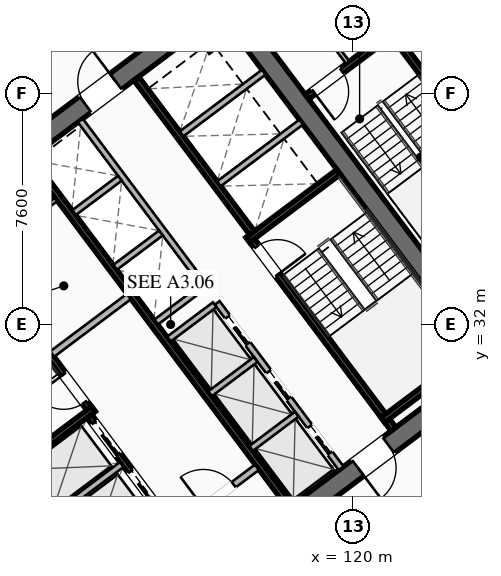
"""IFC4 building model, lengths in metres.
Left out: names, types, materials, properties, quantities, classifications, styles, units other than length and angle.
Written with IfcOpenShell. Run it as: python <this file> out.ifc"""

import sys

from ifc_helpers import new_model, si_unit, direction, frame, frame_2d, origin, place, context, subcontext, project, spatial, rectangle, extrude, element, fill, save


model = new_model("IFC4")
c1 = context("Model", 3, precision=1e-05, world=origin(), true_north=direction((0.0, 1.0)))
c2 = subcontext(c1, "Body", "Model", "MODEL_VIEW")
j1 = project(units=[si_unit("LENGTHUNIT", "METRE"), si_unit("PLANEANGLEUNIT", "RADIAN")], contexts=[c1])
p1 = place(None, origin())
s1 = spatial("IfcSite", under=j1, at=p1, CompositionType="ELEMENT")
p2 = place(p1, origin())
s2 = spatial("IfcBuilding", under=s1, at=p2, CompositionType="ELEMENT")
p3 = place(p2, frame((0.0, 0.0, 92.05)))
s3 = spatial("IfcBuildingStorey", under=s2, at=p3, CompositionType="ELEMENT", Elevation=92.05)
for number, where, z_axis, x_axis in (
    (1, (112.476, 21.107, 0.0), (0.0, 0.0, 1.0), (-0.6, 0.8, 0.0)),
    (2, (115.524, 42.893, 0.0), (0.0, 0.0, 1.0), (0.6, -0.8, 0.0)),
):
    element("IfcWall", number, at=place(p3, frame(where, z_axis=z_axis, x_axis=x_axis)), inside=s3, PredefinedType="SHEAR", context=c2, shape_type="SweptSolid", body=[
        extrude(rectangle(XDim=15.6, YDim=0.65, at=frame_2d((7.8, 0.0))), origin(), (0.0, 0.0, 1.0), 3.55),
    ])
p4 = place(p3, frame((124.429, 30.478, 0.0), z_axis=(0.0, 0.0, 1.0), x_axis=(-0.799998028465, -0.600002628705, 0.0)))
e3 = element("IfcWall", 3, at=p4, inside=s3, PredefinedType="SHEAR", context=c2, shape_type="SweptSolid", body=[
    extrude(rectangle(XDim=14.86, YDim=0.65, at=frame_2d((7.43, 0.0))), origin(), (0.0, 0.0, 1.0), 3.55),
])
p5 = place(p4, frame((9.13, 0.0, 0.0)))
e4 = element("IfcOpeningElement", 4, at=p5, cuts=e3, PredefinedType="OPENING", context=c2, shape_type="SweptSolid", body=[
    extrude(rectangle(XDim=1.25, YDim=2.25, at=frame_2d((0.625, 1.125))), frame((0.0, 0.335, 0.0), z_axis=(0.0, -1.0, 0.0), x_axis=(1.0, 0.0, 0.0)), (0.0, 0.0, 1.0), 0.67),
])
p6 = place(p4, frame((4.08, 0.0, 0.0)))
e5 = element("IfcOpeningElement", 5, at=p6, cuts=e3, PredefinedType="OPENING", context=c2, shape_type="SweptSolid", body=[
    extrude(rectangle(XDim=1.25, YDim=2.25, at=frame_2d((0.625, 1.125))), frame((0.0, 0.335, 0.0), z_axis=(0.0, -1.0, 0.0), x_axis=(1.0, 0.0, 0.0)), (0.0, 0.0, 1.0), 0.67),
])
p7 = place(p3, frame((103.571, 33.522, 0.0), z_axis=(0.0, 0.0, 1.0), x_axis=(0.799998028465, 0.600002628705, 0.0)))
e6 = element("IfcWall", 6, at=p7, inside=s3, PredefinedType="SHEAR", context=c2, shape_type="SweptSolid", body=[
    extrude(rectangle(XDim=14.86, YDim=0.65, at=frame_2d((7.43, 0.0))), origin(), (0.0, 0.0, 1.0), 3.55),
])
p8 = place(p7, frame((4.48, 0.0, 0.0)))
e7 = element("IfcOpeningElement", 7, at=p8, cuts=e6, PredefinedType="OPENING", context=c2, shape_type="SweptSolid", body=[
    extrude(rectangle(XDim=1.25, YDim=2.25, at=frame_2d((0.625, 1.125))), frame((0.0, 0.335, 0.0), z_axis=(0.0, -1.0, 0.0), x_axis=(1.0, 0.0, 0.0)), (0.0, 0.0, 1.0), 0.67),
])
p9 = place(p7, frame((9.53, 0.0, 0.0)))
e8 = element("IfcOpeningElement", 8, at=p9, cuts=e6, PredefinedType="OPENING", context=c2, shape_type="SweptSolid", body=[
    extrude(rectangle(XDim=1.25, YDim=2.25, at=frame_2d((0.625, 1.125))), frame((0.0, 0.335, 0.0), z_axis=(0.0, -1.0, 0.0), x_axis=(1.0, 0.0, 0.0)), (0.0, 0.0, 1.0), 0.67),
])
p10 = place(p3, frame((111.44, 29.08, 0.0), z_axis=(0.0, 0.0, 1.0), x_axis=(-0.600009827119, 0.799992629566, 0.0)))
e9 = element("IfcWall", 9, at=p10, inside=s3, PredefinedType="SHEAR", context=c2, shape_type="SweptSolid", body=[
    extrude(rectangle(XDim=7.95, YDim=0.2, at=frame_2d((3.975, 0.0))), origin(), (0.0, 0.0, 1.0), 3.35),
])
p11 = place(p10, frame((0.45, 0.0, 0.0)))
e10 = element("IfcOpeningElement", 10, at=p11, cuts=e9, PredefinedType="OPENING", context=c2, shape_type="SweptSolid", body=[
    extrude(rectangle(XDim=1.15, YDim=2.2, at=frame_2d((0.575, 1.1))), frame((0.0, 0.11, 0.0), z_axis=(0.0, -1.0, 0.0), x_axis=(1.0, 0.0, 0.0)), (0.0, 0.0, 1.0), 0.22),
])
p12 = place(p3, frame((108.476, 26.982, 0.0), z_axis=(0.0, 0.0, 1.0), x_axis=(0.799984290658, 0.600020945218, 0.0)))
e11 = element("IfcWall", 11, at=p12, inside=s3, PredefinedType="SHEAR", context=c2, shape_type="SweptSolid", body=[
    extrude(rectangle(XDim=3.73, YDim=0.2, at=frame_2d((1.865, 0.0))), origin(), (0.0, 0.0, 1.0), 3.35),
])
p13 = place(p3, frame((116.56, 34.92, 0.0), z_axis=(0.0, 0.0, 1.0), x_axis=(0.600009827119, -0.799992629566, 0.0)))
e12 = element("IfcWall", 12, at=p13, inside=s3, PredefinedType="SHEAR", context=c2, shape_type="SweptSolid", body=[
    extrude(rectangle(XDim=7.95, YDim=0.2, at=frame_2d((3.975, 0.0))), origin(), (0.0, 0.0, 1.0), 3.35),
])
p14 = place(p13, frame((0.45, 0.0, 0.0)))
e13 = element("IfcOpeningElement", 13, at=p14, cuts=e12, PredefinedType="OPENING", context=c2, shape_type="SweptSolid", body=[
    extrude(rectangle(XDim=1.15, YDim=2.2, at=frame_2d((0.575, 1.1))), frame((0.0, 0.11, 0.0), z_axis=(0.0, -1.0, 0.0), x_axis=(1.0, 0.0, 0.0)), (0.0, 0.0, 1.0), 0.22),
])
for number, where, z_axis, x_axis in (
    (14, (116.54, 34.78, 0.0), (0.0, 0.0, 1.0), (0.8, 0.6, 0.0)),
    (15, (120.98, 28.86, 0.0), (0.0, 0.0, 1.0), (0.8, 0.6, 0.0)),
):
    element("IfcWall", number, at=place(p3, frame(where, z_axis=z_axis, x_axis=x_axis)), inside=s3, PredefinedType="SHEAR", context=c2, shape_type="SweptSolid", body=[
        extrude(rectangle(XDim=3.73, YDim=0.2, at=frame_2d((1.865, 0.0))), origin(), (0.0, 0.0, 1.0), 3.35),
    ])
p15 = place(p3, frame((117.938, 26.016, 0.0), z_axis=(0.0, 0.0, 1.0), x_axis=(-0.600005463273, 0.799995902516, 0.0)))
e16 = element("IfcWall", 16, at=p15, inside=s3, PredefinedType="SHEAR", context=c2, shape_type="SweptSolid", body=[
    extrude(rectangle(XDim=14.3, YDim=0.2, at=frame_2d((7.15, 0.0))), origin(), (0.0, 0.0, 1.0), 3.35),
])
p16 = place(p3, frame((110.104, 31.028, 0.0), z_axis=(0.0, 0.0, 1.0), x_axis=(0.800018601094, 0.59997519774, 0.0)))
e17 = element("IfcWall", 17, at=p16, inside=s3, PredefinedType="SOLIDWALL", context=c2, shape_type="SweptSolid", body=[
    extrude(rectangle(XDim=3.15, YDim=0.22, at=frame_2d((1.575, 0.0))), origin(), (0.0, 0.0, 1.0), 2.703),
])
p17 = place(p3, frame((114.316, 25.412, 0.0), z_axis=(0.0, 0.0, 1.0), x_axis=(0.800018601094, 0.59997519774, 0.0)))
e18 = element("IfcWall", 18, at=p17, inside=s3, PredefinedType="SOLIDWALL", context=c2, shape_type="SweptSolid", body=[
    extrude(rectangle(XDim=3.15, YDim=0.22, at=frame_2d((1.575, 0.0))), origin(), (0.0, 0.0, 1.0), 2.703),
])
p18 = place(p17, frame((0.95, 0.0, 0.0)))
e19 = element("IfcOpeningElement", 19, at=p18, cuts=e18, PredefinedType="OPENING", context=c2, shape_type="SweptSolid", body=[
    extrude(rectangle(XDim=1.25, YDim=2.25, at=frame_2d((0.625, 1.125))), frame((0.0, 0.12, 0.0), z_axis=(0.0, -1.0, 0.0), x_axis=(1.0, 0.0, 0.0)), (0.0, 0.0, 1.0), 0.24),
])
p19 = place(p3, frame((115.13, 23.91, 0.0), z_axis=(0.0, 0.0, 1.0), x_axis=(-0.599975393228, 0.800018454488, 0.0)))
e20 = element("IfcWall", 20, at=p19, inside=s3, PredefinedType="SHEAR", context=c2, shape_type="SweptSolid", body=[
    extrude(rectangle(XDim=6.35, YDim=0.2, at=frame_2d((3.175, 0.0))), origin(), (0.0, 0.0, 1.0), 3.35),
])
p20 = place(p19, frame((4.775, 0.0, 0.0)))
e21 = element("IfcOpeningElement", 21, at=p20, cuts=e20, PredefinedType="OPENING", context=c2, shape_type="SweptSolid", body=[
    extrude(rectangle(XDim=1.3, YDim=2.25, at=frame_2d((0.65, 1.125))), frame((0.0, 0.11, 0.0), z_axis=(0.0, -1.0, 0.0), x_axis=(1.0, 0.0, 0.0)), (0.0, 0.0, 1.0), 0.22),
])
p21 = place(p19, frame((2.775, 0.0, 0.0)))
e22 = element("IfcOpeningElement", 22, at=p21, cuts=e20, PredefinedType="OPENING", context=c2, shape_type="SweptSolid", body=[
    extrude(rectangle(XDim=1.3, YDim=2.25, at=frame_2d((0.65, 1.125))), frame((0.0, 0.11, 0.0), z_axis=(0.0, -1.0, 0.0), x_axis=(1.0, 0.0, 0.0)), (0.0, 0.0, 1.0), 0.22),
])
p22 = place(p19, frame((0.575, 0.0, 0.0)))
e23 = element("IfcOpeningElement", 23, at=p22, cuts=e20, PredefinedType="OPENING", context=c2, shape_type="SweptSolid", body=[
    extrude(rectangle(XDim=1.3, YDim=2.25, at=frame_2d((0.65, 1.125))), frame((0.0, 0.11, 0.0), z_axis=(0.0, -1.0, 0.0), x_axis=(1.0, 0.0, 0.0)), (0.0, 0.0, 1.0), 0.22),
])
p23 = place(p3, frame((109.688, 25.366, 0.0), z_axis=(0.0, 0.0, 1.0), x_axis=(0.8, 0.6, 0.0)))
e24 = element("IfcWall", 24, at=p23, inside=s3, PredefinedType="SOLIDWALL", context=c2, shape_type="SweptSolid", body=[
    extrude(rectangle(XDim=3.38, YDim=0.2, at=frame_2d((1.69, 0.0))), origin(), (0.0, 0.0, 1.0), 3.35),
])
p24 = place(p3, frame((112.87, 40.09, 0.0), z_axis=(0.0, 0.0, 1.0), x_axis=(0.599975393228, -0.800018454488, 0.0)))
e25 = element("IfcWall", 25, at=p24, inside=s3, PredefinedType="SHEAR", context=c2, shape_type="SweptSolid", body=[
    extrude(rectangle(XDim=6.35, YDim=0.2, at=frame_2d((3.175, 0.0))), origin(), (0.0, 0.0, 1.0), 3.35),
])
for number, where, z_axis, x_axis in (
    (26, (115.59, 36.63, 0.0), (0.0, 0.0, 1.0), (0.8, 0.6, 0.0)),
    (27, (114.36, 38.27, 0.0), (0.0, 0.0, 1.0), (0.8, 0.6, 0.0)),
):
    element("IfcWall", number, at=place(p3, frame(where, z_axis=z_axis, x_axis=x_axis)), inside=s3, PredefinedType="SOLIDWALL", context=c2, shape_type="SweptSolid", body=[
        extrude(rectangle(XDim=3.38, YDim=0.2, at=frame_2d((1.69, 0.0))), origin(), (0.0, 0.0, 1.0), 3.35),
    ])
p25 = place(p3, frame((107.71, 34.22, 0.0), z_axis=(0.0, 0.0, 1.0), x_axis=(0.799981399002, 0.60002480053, 0.0)))
e28 = element("IfcWall", 28, at=p25, inside=s3, PredefinedType="PARTITIONING", context=c2, shape_type="SweptSolid", body=[
    extrude(rectangle(XDim=3.15, YDim=0.135, at=frame_2d((1.575, 0.0))), origin(), (0.0, 0.0, 1.0), 2.703),
])
p26 = place(p25, frame((1.05, 0.0, 0.0)))
e29 = element("IfcOpeningElement", 29, at=p26, cuts=e28, PredefinedType="OPENING", context=c2, shape_type="SweptSolid", body=[
    extrude(rectangle(XDim=1.05, YDim=2.2, at=frame_2d((0.525, 1.1))), frame((0.0, 0.077, 0.0), z_axis=(0.0, -1.0, 0.0), x_axis=(1.0, 0.0, 0.0)), (0.0, 0.0, 1.0), 0.155),
])
p27 = place(p3, frame((119.61, 27.27, 0.0), z_axis=(0.0, 0.0, 1.0), x_axis=(-0.600011488909, 0.79999138319, 0.0)))
e30 = element("IfcWall", 30, at=p27, inside=s3, PredefinedType="SOLIDWALL", context=c2, shape_type="SweptSolid", body=[
    extrude(rectangle(XDim=6.8, YDim=0.2, at=frame_2d((3.4, 0.0))), origin(), (0.0, 0.0, 1.0), 3.35),
])
p28 = place(p27, frame((0.625, 0.0, 0.0)))
e31 = element("IfcOpeningElement", 31, at=p28, cuts=e30, PredefinedType="OPENING", context=c2, shape_type="SweptSolid", body=[
    extrude(rectangle(XDim=1.1, YDim=2.2, at=frame_2d((0.55, 1.1))), frame((0.0, 0.11, 0.0), z_axis=(0.0, -1.0, 0.0), x_axis=(1.0, 0.0, 0.0)), (0.0, 0.0, 1.0), 0.22),
])
p29 = place(p27, frame((2.875, 0.0, 0.0)))
e32 = element("IfcOpeningElement", 32, at=p29, cuts=e30, PredefinedType="OPENING", context=c2, shape_type="SweptSolid", body=[
    extrude(rectangle(XDim=1.1, YDim=2.2, at=frame_2d((0.55, 1.1))), frame((0.0, 0.11, 0.0), z_axis=(0.0, -1.0, 0.0), x_axis=(1.0, 0.0, 0.0)), (0.0, 0.0, 1.0), 0.22),
])
p30 = place(p27, frame((5.125, 0.0, 0.0)))
e33 = element("IfcOpeningElement", 33, at=p30, cuts=e30, PredefinedType="OPENING", context=c2, shape_type="SweptSolid", body=[
    extrude(rectangle(XDim=1.1, YDim=2.2, at=frame_2d((0.55, 1.1))), frame((0.0, 0.11, 0.0), z_axis=(0.0, -1.0, 0.0), x_axis=(1.0, 0.0, 0.0)), (0.0, 0.0, 1.0), 0.22),
])
p31 = place(p3, frame((116.646, 27.922, 0.0), z_axis=(0.0, 0.0, 1.0), x_axis=(0.8, 0.6, 0.0)))
e34 = element("IfcWall", 34, at=p31, inside=s3, PredefinedType="SOLIDWALL", context=c2, shape_type="SweptSolid", body=[
    extrude(rectangle(XDim=1.88, YDim=0.2, at=frame_2d((0.94, 0.0))), origin(), (0.0, 0.0, 1.0), 3.35),
])
p32 = place(p3, frame((115.296, 29.722, 0.0), z_axis=(0.0, 0.0, 1.0), x_axis=(0.799984418148, 0.600020775241, 0.0)))
e35 = element("IfcWall", 35, at=p32, inside=s3, PredefinedType="SOLIDWALL", context=c2, shape_type="SweptSolid", body=[
    extrude(rectangle(XDim=1.88, YDim=0.2, at=frame_2d((0.94, 0.0))), origin(), (0.0, 0.0, 1.0), 3.35),
])
p33 = place(p3, frame((113.946, 31.522, 0.0), z_axis=(0.0, 0.0, 1.0), x_axis=(0.8, 0.6, 0.0)))
e36 = element("IfcWall", 36, at=p33, inside=s3, PredefinedType="SOLIDWALL", context=c2, shape_type="SweptSolid", body=[
    extrude(rectangle(XDim=1.88, YDim=0.2, at=frame_2d((0.94, 0.0))), origin(), (0.0, 0.0, 1.0), 3.35),
])
p34 = place(p3, frame((115.11, 33.27, 0.0), z_axis=(0.0, 0.0, 1.0), x_axis=(-0.600011488909, 0.79999138319, 0.0)))
e37 = element("IfcWall", 37, at=p34, inside=s3, PredefinedType="SOLIDWALL", context=c2, shape_type="SweptSolid", body=[
    extrude(rectangle(XDim=6.8, YDim=0.2, at=frame_2d((3.4, 0.0))), origin(), (0.0, 0.0, 1.0), 3.35),
])
p35 = place(p3, frame((113.526, 32.082, 0.0), z_axis=(0.0, 0.0, 1.0), x_axis=(0.800046745961, 0.599937666993, 0.0)))
e38 = element("IfcWall", 38, at=p35, inside=s3, PredefinedType="SOLIDWALL", context=c2, shape_type="SweptSolid", body=[
    extrude(rectangle(XDim=1.88, YDim=0.2, at=frame_2d((0.94, 0.0))), origin(), (0.0, 0.0, 1.0), 3.35),
])
p36 = place(p3, frame((112.176, 33.882, 0.0), z_axis=(0.0, 0.0, 1.0), x_axis=(0.8, 0.6, 0.0)))
e39 = element("IfcWall", 39, at=p36, inside=s3, PredefinedType="SOLIDWALL", context=c2, shape_type="SweptSolid", body=[
    extrude(rectangle(XDim=1.88, YDim=0.2, at=frame_2d((0.94, 0.0))), origin(), (0.0, 0.0, 1.0), 3.35),
])
p37 = place(p3, frame((110.826, 35.682, 0.0), z_axis=(0.0, 0.0, 1.0), x_axis=(0.799984418148, 0.600020775241, 0.0)))
e40 = element("IfcWall", 40, at=p37, inside=s3, PredefinedType="SOLIDWALL", context=c2, shape_type="SweptSolid", body=[
    extrude(rectangle(XDim=1.88, YDim=0.2, at=frame_2d((0.94, 0.0))), origin(), (0.0, 0.0, 1.0), 3.35),
])
p38 = place(p3, frame((125.304, 36.228, 0.0), z_axis=(0.0, 0.0, 1.0), x_axis=(-0.59998851072, 0.800008616831, 0.0)))
e41 = element("IfcWall", 41, at=p38, inside=s3, PredefinedType="SHEAR", context=c2, shape_type="SweptSolid", body=[
    extrude(rectangle(XDim=6.8, YDim=0.2, at=frame_2d((3.4, 0.0))), origin(), (0.0, 0.0, 1.0), 3.35),
])
p39 = place(p3, frame((121.204, 41.528, 0.0), z_axis=(0.0, 0.0, 1.0), x_axis=(-0.800017232136, -0.599977023131, 0.0)))
e42 = element("IfcWall", 42, at=p39, inside=s3, PredefinedType="SHEAR", context=c2, shape_type="SweptSolid", body=[
    extrude(rectangle(XDim=3.4, YDim=0.2, at=frame_2d((1.7, 0.0))), origin(), (0.0, 0.0, 1.0), 3.35),
])
p40 = place(p39, frame((1.975, 0.0, 0.0)))
e43 = element("IfcOpeningElement", 43, at=p40, cuts=e42, PredefinedType="OPENING", context=c2, shape_type="SweptSolid", body=[
    extrude(rectangle(XDim=1.15, YDim=2.2, at=frame_2d((0.575, 1.1))), frame((0.0, 0.11, 0.0), z_axis=(0.0, -1.0, 0.0), x_axis=(1.0, 0.0, 0.0)), (0.0, 0.0, 1.0), 0.22),
])
p41 = place(p3, frame((119.824, 40.618, 0.0), z_axis=(0.0, 0.0, 1.0), x_axis=(-0.599982243973, 0.800013316712, 0.0)))
e44 = element("IfcWall", 44, at=p41, inside=s3, PredefinedType="PARTITIONING", context=c2, shape_type="SweptSolid", body=[
    extrude(rectangle(XDim=4.4, YDim=0.135, at=frame_2d((2.2, 0.0))), origin(), (0.0, 0.0, 1.0), 2.703),
])
p42 = place(p3, frame((98.316, 33.862, 0.0), z_axis=(0.0, 0.0, 1.0), x_axis=(0.8000041147, 0.599994513695, 0.0)))
e45 = element("IfcWall", 45, at=p42, inside=s3, PredefinedType="PARTITIONING", context=c2, shape_type="SweptSolid", body=[
    extrude(rectangle(XDim=28.48, YDim=0.135, at=frame_2d((14.24, 0.0))), origin(), (0.0, 0.0, 1.0), 2.703),
])
p43 = place(p42, frame((0.3, 0.0, 0.0)))
e46 = element("IfcOpeningElement", 46, at=p43, cuts=e45, PredefinedType="OPENING", context=c2, shape_type="SweptSolid", body=[
    extrude(rectangle(XDim=0.95, YDim=2.05, at=frame_2d((0.475, 1.025))), frame((0.0, 0.077, 0.0), z_axis=(0.0, -1.0, 0.0), x_axis=(1.0, 0.0, 0.0)), (0.0, 0.0, 1.0), 0.155),
])
p44 = place(p42, frame((7.195, 0.0, 0.0)))
e47 = element("IfcOpeningElement", 47, at=p44, cuts=e45, PredefinedType="OPENING", context=c2, shape_type="SweptSolid", body=[
    extrude(rectangle(XDim=0.95, YDim=2.05, at=frame_2d((0.475, 1.025))), frame((0.0, 0.077, 0.0), z_axis=(0.0, -1.0, 0.0), x_axis=(1.0, 0.0, 0.0)), (0.0, 0.0, 1.0), 0.155),
])
p45 = place(p42, frame((11.222, 0.0, 0.0)))
e48 = element("IfcOpeningElement", 48, at=p45, cuts=e45, PredefinedType="OPENING", context=c2, shape_type="SweptSolid", body=[
    extrude(rectangle(XDim=0.95, YDim=2.05, at=frame_2d((0.475, 1.025))), frame((0.0, 0.077, 0.0), z_axis=(0.0, -1.0, 0.0), x_axis=(1.0, 0.0, 0.0)), (0.0, 0.0, 1.0), 0.155),
])
p46 = place(p42, frame((27.23, 0.0, 0.0)))
e49 = element("IfcOpeningElement", 49, at=p46, cuts=e45, PredefinedType="OPENING", context=c2, shape_type="SweptSolid", body=[
    extrude(rectangle(XDim=0.95, YDim=2.05, at=frame_2d((0.475, 1.025))), frame((0.0, 0.077, 0.0), z_axis=(0.0, -1.0, 0.0), x_axis=(1.0, 0.0, 0.0)), (0.0, 0.0, 1.0), 0.155),
])
p47 = place(p3, frame((134.462, 33.134, 0.0), z_axis=(0.0, 0.0, 1.0), x_axis=(-0.799996913945, -0.600004114717, 0.0)))
e50 = element("IfcWall", 50, at=p47, inside=s3, PredefinedType="PARTITIONING", context=c2, shape_type="SweptSolid", body=[
    extrude(rectangle(XDim=28.48, YDim=0.135, at=frame_2d((14.24, 0.0))), origin(), (0.0, 0.0, 1.0), 2.703),
])
p48 = place(p47, frame((27.15, 0.0, 0.0)))
e51 = element("IfcOpeningElement", 51, at=p48, cuts=e50, PredefinedType="OPENING", context=c2, shape_type="SweptSolid", body=[
    extrude(rectangle(XDim=0.95, YDim=2.05, at=frame_2d((0.475, 1.025))), frame((0.0, 0.077, 0.0), z_axis=(0.0, -1.0, 0.0), x_axis=(1.0, 0.0, 0.0)), (0.0, 0.0, 1.0), 0.155),
])
p49 = place(p47, frame((0.38, 0.0, 0.0)))
e52 = element("IfcOpeningElement", 52, at=p49, cuts=e50, PredefinedType="OPENING", context=c2, shape_type="SweptSolid", body=[
    extrude(rectangle(XDim=0.95, YDim=2.05, at=frame_2d((0.475, 1.025))), frame((0.0, 0.077, 0.0), z_axis=(0.0, -1.0, 0.0), x_axis=(1.0, 0.0, 0.0)), (0.0, 0.0, 1.0), 0.155),
])
p50 = place(p3, frame((111.63, 16.11, 0.0), z_axis=(0.0, 0.0, 1.0), x_axis=(-0.599996466511, 0.800002650104, 0.0)))
e53 = element("IfcWall", 53, at=p50, inside=s3, PredefinedType="PARTITIONING", context=c2, shape_type="SweptSolid", body=[
    extrude(rectangle(XDim=22.11, YDim=0.135, at=frame_2d((11.055, 0.0))), origin(), (0.0, 0.0, 1.0), 2.703),
])
p51 = place(p50, frame((0.3, 0.0, 0.0)))
e54 = element("IfcOpeningElement", 54, at=p51, cuts=e53, PredefinedType="OPENING", context=c2, shape_type="SweptSolid", body=[
    extrude(rectangle(XDim=0.95, YDim=2.05, at=frame_2d((0.475, 1.025))), frame((0.0, 0.077, 0.0), z_axis=(0.0, -1.0, 0.0), x_axis=(1.0, 0.0, 0.0)), (0.0, 0.0, 1.0), 0.155),
])
p52 = place(p9, origin())
e55 = element("IfcDoor", 55, at=p52, inside=s3, OperationType="SINGLE_SWING_RIGHT", PredefinedType="DOOR", context=c2, shape_type="SweptSolid", body=[
    extrude(rectangle(XDim=1.25, YDim=2.25, at=frame_2d((0.625, 1.125))), frame((0.0, 0.025, 0.0), z_axis=(0.0, -1.0, 0.0), x_axis=(1.0, 0.0, 0.0)), (0.0, 0.0, 1.0), 0.05),
])
fill(e8, e55)
p53 = place(p6, origin())
e56 = element("IfcDoor", 56, at=p53, inside=s3, OperationType="SINGLE_SWING_RIGHT", PredefinedType="DOOR", context=c2, shape_type="SweptSolid", body=[
    extrude(rectangle(XDim=1.25, YDim=2.25, at=frame_2d((0.625, 1.125))), frame((0.0, 0.025, 0.0), z_axis=(0.0, -1.0, 0.0), x_axis=(1.0, 0.0, 0.0)), (0.0, 0.0, 1.0), 0.05),
])
fill(e5, e56)
p54 = place(p11, origin())
e57 = element("IfcDoor", 57, at=p54, inside=s3, OperationType="SINGLE_SWING_RIGHT", PredefinedType="DOOR", context=c2, shape_type="SweptSolid", body=[
    extrude(rectangle(XDim=1.15, YDim=2.2, at=frame_2d((0.575, 1.1))), frame((0.0, 0.025, 0.0), z_axis=(0.0, -1.0, 0.0), x_axis=(1.0, 0.0, 0.0)), (0.0, 0.0, 1.0), 0.05),
])
fill(e10, e57)
p55 = place(p14, origin())
e58 = element("IfcDoor", 58, at=p55, inside=s3, OperationType="SINGLE_SWING_RIGHT", PredefinedType="DOOR", context=c2, shape_type="SweptSolid", body=[
    extrude(rectangle(XDim=1.15, YDim=2.2, at=frame_2d((0.575, 1.1))), frame((0.0, 0.025, 0.0), z_axis=(0.0, -1.0, 0.0), x_axis=(1.0, 0.0, 0.0)), (0.0, 0.0, 1.0), 0.05),
])
fill(e13, e58)
p56 = place(p18, origin())
e59 = element("IfcDoor", 59, at=p56, inside=s3, OperationType="SINGLE_SWING_LEFT", PredefinedType="DOOR", context=c2, shape_type="SweptSolid", body=[
    extrude(rectangle(XDim=1.25, YDim=2.25, at=frame_2d((0.625, 1.125))), frame((0.0, 0.025, 0.0), z_axis=(0.0, -1.0, 0.0), x_axis=(1.0, 0.0, 0.0)), (0.0, 0.0, 1.0), 0.05),
])
fill(e19, e59)
p57 = place(p40, origin())
e60 = element("IfcDoor", 60, at=p57, inside=s3, OperationType="SINGLE_SWING_RIGHT", PredefinedType="DOOR", context=c2, shape_type="SweptSolid", body=[
    extrude(rectangle(XDim=1.15, YDim=2.2, at=frame_2d((0.575, 1.1))), frame((0.0, 0.025, 0.0), z_axis=(0.0, -1.0, 0.0), x_axis=(1.0, 0.0, 0.0)), (0.0, 0.0, 1.0), 0.05),
])
fill(e43, e60)
p58 = place(p20, origin())
e61 = element("IfcDoor", 61, at=p58, inside=s3, OperationType="SLIDING_TO_LEFT", PredefinedType="DOOR", context=c2, shape_type="SweptSolid", body=[
    extrude(rectangle(XDim=1.3, YDim=2.25, at=frame_2d((0.65, 1.125))), frame((0.0, 0.025, 0.0), z_axis=(0.0, -1.0, 0.0), x_axis=(1.0, 0.0, 0.0)), (0.0, 0.0, 1.0), 0.05),
])
fill(e21, e61)
p59 = place(p21, origin())
e62 = element("IfcDoor", 62, at=p59, inside=s3, OperationType="SLIDING_TO_LEFT", PredefinedType="DOOR", context=c2, shape_type="SweptSolid", body=[
    extrude(rectangle(XDim=1.3, YDim=2.25, at=frame_2d((0.65, 1.125))), frame((0.0, 0.025, 0.0), z_axis=(0.0, -1.0, 0.0), x_axis=(1.0, 0.0, 0.0)), (0.0, 0.0, 1.0), 0.05),
])
fill(e22, e62)
p60 = place(p28, origin())
e63 = element("IfcDoor", 63, at=p60, inside=s3, OperationType="SLIDING_TO_LEFT", PredefinedType="DOOR", context=c2, shape_type="SweptSolid", body=[
    extrude(rectangle(XDim=1.1, YDim=2.2, at=frame_2d((0.55, 1.1))), frame((0.0, 0.025, 0.0), z_axis=(0.0, -1.0, 0.0), x_axis=(1.0, 0.0, 0.0)), (0.0, 0.0, 1.0), 0.05),
])
fill(e31, e63)
p61 = place(p29, origin())
e64 = element("IfcDoor", 64, at=p61, inside=s3, OperationType="SLIDING_TO_LEFT", PredefinedType="DOOR", context=c2, shape_type="SweptSolid", body=[
    extrude(rectangle(XDim=1.1, YDim=2.2, at=frame_2d((0.55, 1.1))), frame((0.0, 0.025, 0.0), z_axis=(0.0, -1.0, 0.0), x_axis=(1.0, 0.0, 0.0)), (0.0, 0.0, 1.0), 0.05),
])
fill(e32, e64)
p62 = place(p30, origin())
e65 = element("IfcDoor", 65, at=p62, inside=s3, OperationType="SLIDING_TO_LEFT", PredefinedType="DOOR", context=c2, shape_type="SweptSolid", body=[
    extrude(rectangle(XDim=1.1, YDim=2.2, at=frame_2d((0.55, 1.1))), frame((0.0, 0.025, 0.0), z_axis=(0.0, -1.0, 0.0), x_axis=(1.0, 0.0, 0.0)), (0.0, 0.0, 1.0), 0.05),
])
fill(e33, e65)
save(model, sys.argv[1])
